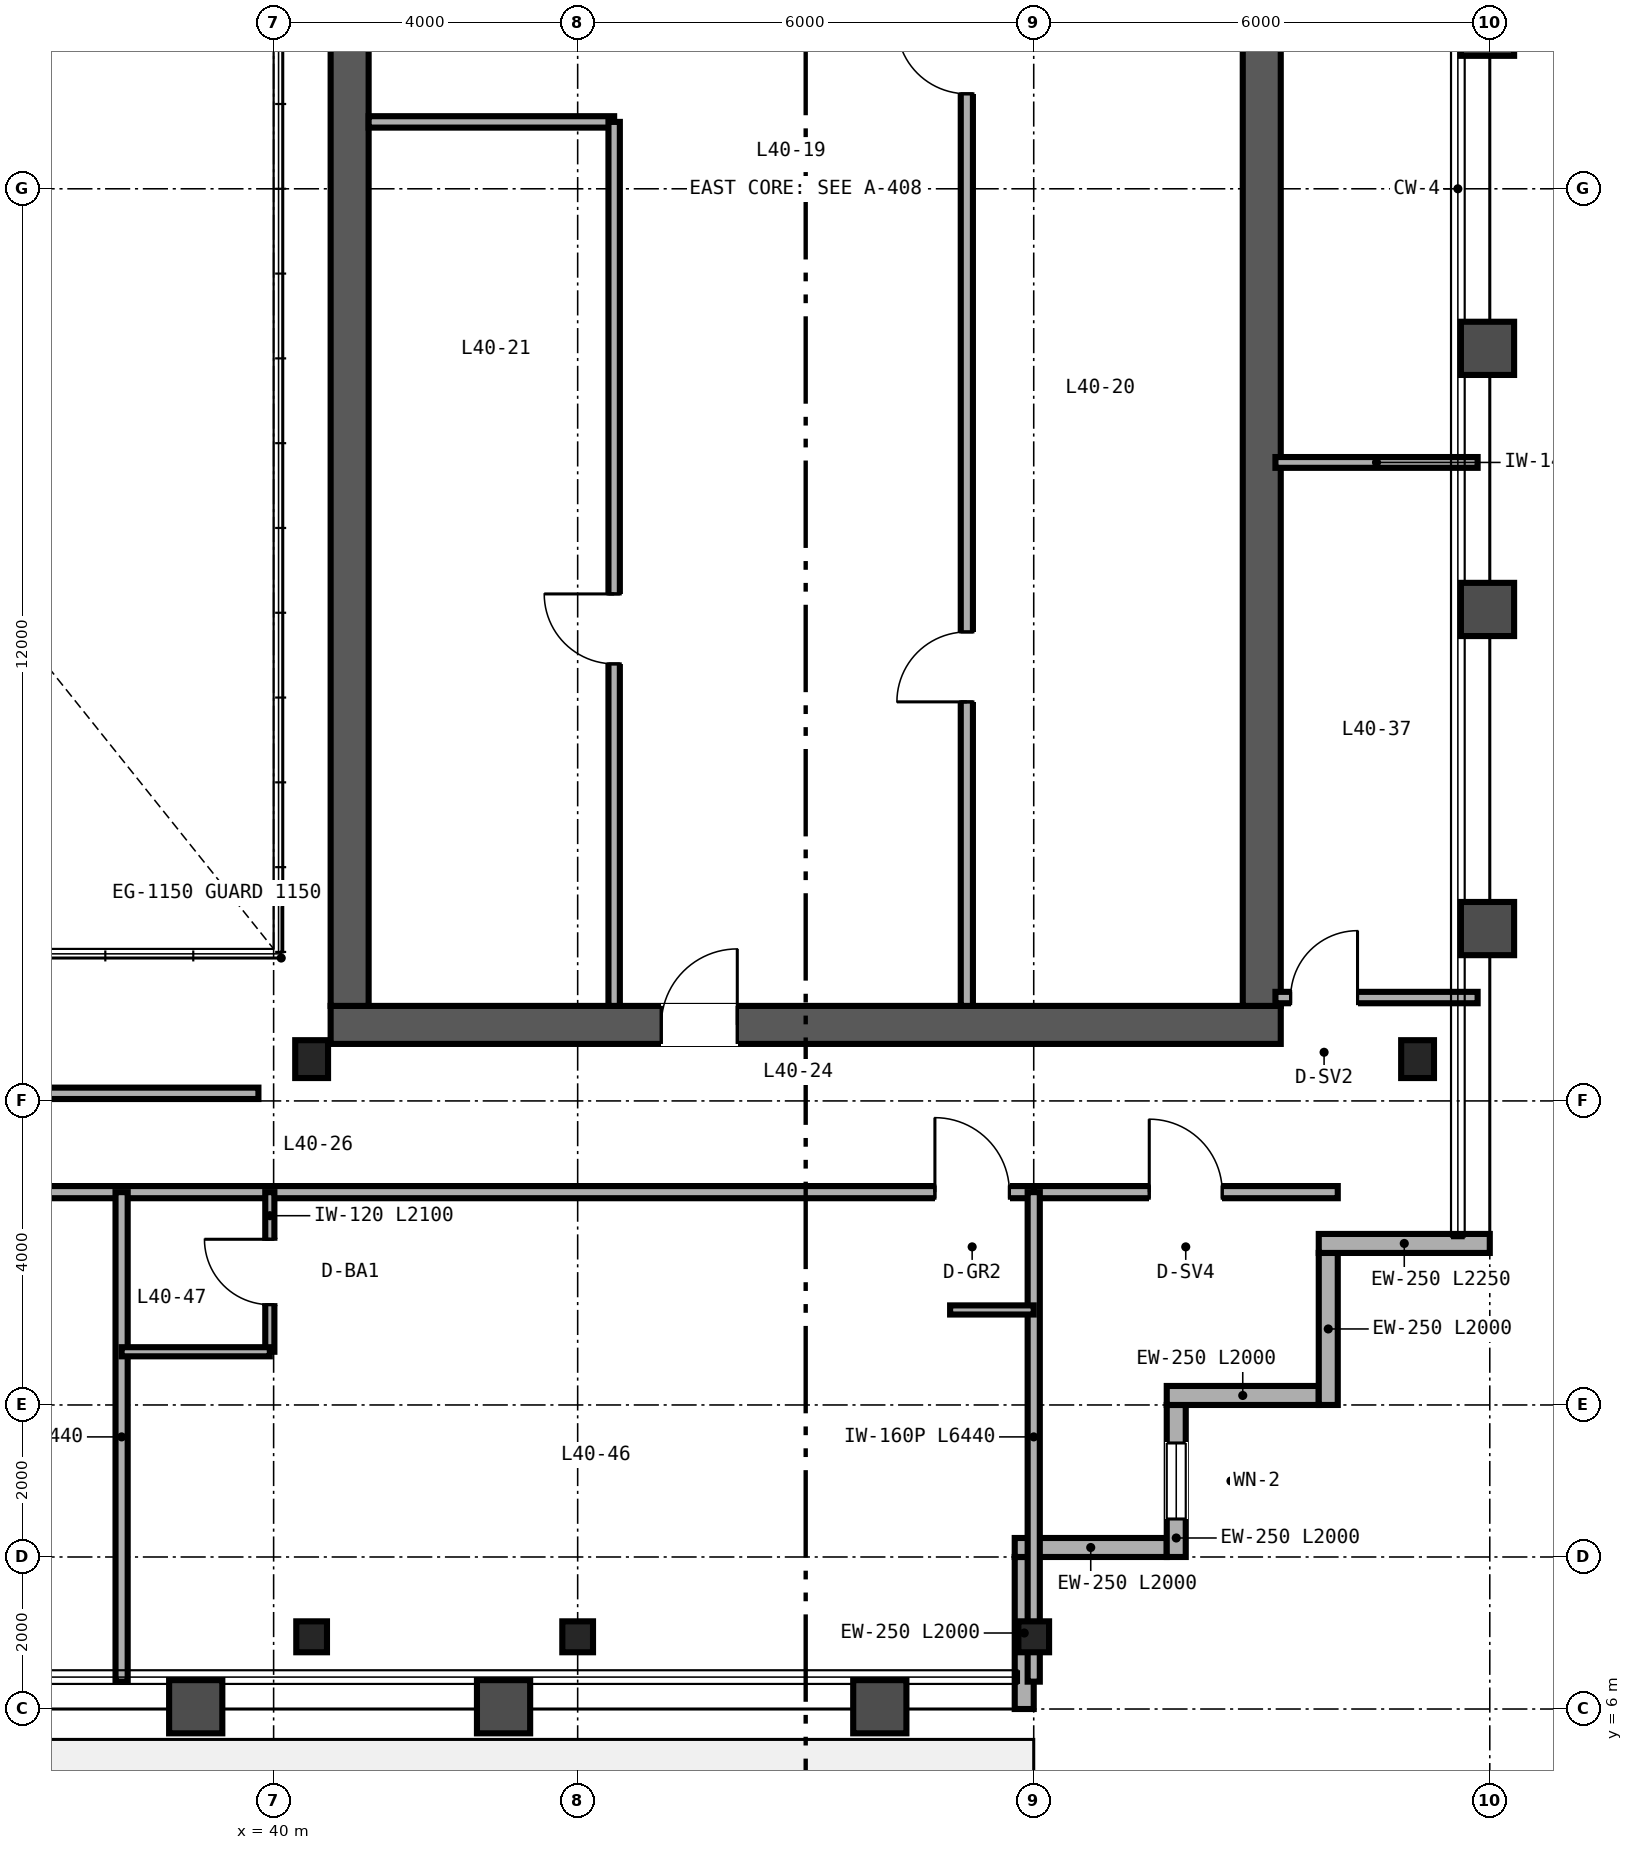
"""IFC4 building model, lengths in metres.
Left out: names, types, materials, properties, quantities, classifications, styles, units other than length and angle.
Written with IfcOpenShell. Run it as: python <this file> out.ifc"""

import sys

from ifc_helpers import new_model, si_unit, direction, frame, frame_2d, origin, origin_2d, place, context, subcontext, project, spatial, rectangle, i_section, extrude, source, transform, mapped, element, fill, save


model = new_model("IFC4")
c1 = context("Model", 3, precision=1e-05, world=origin(), true_north=direction((0.0, 1.0)))
c2 = subcontext(c1, "Body", "Model", "MODEL_VIEW")
j1 = project(units=[si_unit("LENGTHUNIT", "METRE"), si_unit("PLANEANGLEUNIT", "RADIAN")], contexts=[c1])
p1 = place(None, origin())
s1 = spatial("IfcSite", under=j1, at=p1, CompositionType="ELEMENT")
p2 = place(p1, origin())
s2 = spatial("IfcBuilding", under=s1, at=p2, CompositionType="ELEMENT")
p3 = place(p2, frame((0.0, 0.0, 163.2)))
s3 = spatial("IfcBuildingStorey", under=s2, at=p3, CompositionType="ELEMENT", Elevation=163.2)
p4 = place(p3, frame((40.75, 15.0, 0.0), z_axis=(0.0, 0.0, 1.0), x_axis=(1.0, 0.0, 0.0)))
e1 = element("IfcWall", 1, at=p4, inside=s3, PredefinedType="SHEAR", context=c2, shape_type="SweptSolid", body=[
    extrude(rectangle(XDim=12.5, YDim=0.5, at=frame_2d((6.25, 0.0))), origin(), (0.0, 0.0, 1.0), 3.37),
])
p5 = place(p4, frame((4.35, 0.0, 0.0)))
e2 = element("IfcOpeningElement", 2, at=p5, cuts=e1, PredefinedType="OPENING", context=c2, shape_type="SweptSolid", body=[
    extrude(rectangle(XDim=1.0, YDim=2.15, at=frame_2d((0.5, 1.075))), frame((0.0, 0.26, 0.0), z_axis=(0.0, -1.0, 0.0), x_axis=(1.0, 0.0, 0.0)), (0.0, 0.0, 1.0), 0.52),
])
for number, where, z_axis, x_axis in (
    (3, (41.0, 15.25, 0.0), (0.0, 0.0, 1.0), (0.0, 1.0, 0.0)),
    (4, (53.0, 15.25, 0.0), (0.0, 0.0, 1.0), (0.0, 1.0, 0.0)),
):
    element("IfcWall", number, at=place(p3, frame(where, z_axis=z_axis, x_axis=x_axis)), inside=s3, PredefinedType="SHEAR", context=c2, shape_type="SweptSolid", body=[
        extrude(rectangle(XDim=21.5, YDim=0.5, at=frame_2d((10.75, 0.0))), origin(), (0.0, 0.0, 1.0), 3.37),
    ])
m1 = source(origin(), c2, "Body", "SweptSolid", [
    extrude(i_section(OverallWidth=0.432, OverallDepth=0.498, WebThickness=0.056, FlangeThickness=0.089, FilletRadius=0.025, at=origin_2d()), origin(), (0.0, 0.0, 1.0), 3.37),
])
for number, where, z_axis, x_axis in (
    (5, (40.5, 14.55, 0.0), (0.0, 0.0, 1.0), (1.0, 0.0, 0.0)),
    (6, (55.05, 14.55, 0.0), (0.0, 0.0, 1.0), (1.0, 0.0, 0.0)),
):
    element("IfcColumn", number, at=place(p3, frame(where, z_axis=z_axis, x_axis=x_axis)), inside=s3, PredefinedType="COLUMN", context=c2, shape_type="MappedRepresentation", body=[
        mapped(m1, transform((0.0, 0.0, 0.0), scale=1.0)),
    ])
m2 = source(origin(), c2, "Body", "SweptSolid", [
    extrude(i_section(OverallWidth=0.404, OverallDepth=0.407, WebThickness=0.027, FlangeThickness=0.044, FilletRadius=0.025, at=origin_2d()), origin(), (0.0, 0.0, 1.0), 3.37),
])
for number, where, z_axis, x_axis in (
    (7, (40.5, 6.95, 0.0), (0.0, 0.0, 1.0), (1.0, 0.0, 0.0)),
    (8, (44.0, 6.95, 0.0), (0.0, 0.0, 1.0), (1.0, 0.0, 0.0)),
    (9, (50.0, 6.95, 0.0), (0.0, 0.0, 1.0), (1.0, 0.0, 0.0)),
):
    element("IfcColumn", number, at=place(p3, frame(where, z_axis=z_axis, x_axis=x_axis)), inside=s3, PredefinedType="COLUMN", context=c2, shape_type="MappedRepresentation", body=[
        mapped(m2, transform((0.0, 0.0, 0.0), scale=1.0)),
    ])
p6 = place(p3, frame((49.875, 6.0, 0.0), z_axis=(0.0, 0.0, 1.0), x_axis=(0.0, 1.0, 0.0)))
e10 = element("IfcWall", 10, at=p6, inside=s3, PredefinedType="SOLIDWALL", context=c2, shape_type="SweptSolid", body=[
    extrude(rectangle(XDim=2.0, YDim=0.25, at=frame_2d((1.0, 0.0))), origin(), (0.0, 0.0, 1.0), 2.677),
])
p7 = place(p3, frame((49.75, 8.125, 0.0), z_axis=(0.0, 0.0, 1.0), x_axis=(1.0, 0.0, 0.0)))
e11 = element("IfcWall", 11, at=p7, inside=s3, PredefinedType="SOLIDWALL", context=c2, shape_type="SweptSolid", body=[
    extrude(rectangle(XDim=2.0, YDim=0.25, at=frame_2d((1.0, 0.0))), origin(), (0.0, 0.0, 1.0), 3.37),
])
p8 = place(p3, frame((51.875, 8.0, 0.0), z_axis=(0.0, 0.0, 1.0), x_axis=(0.0, 1.0, 0.0)))
e12 = element("IfcWall", 12, at=p8, inside=s3, PredefinedType="SOLIDWALL", context=c2, shape_type="SweptSolid", body=[
    extrude(rectangle(XDim=2.0, YDim=0.25, at=frame_2d((1.0, 0.0))), origin(), (0.0, 0.0, 1.0), 3.37),
])
p9 = place(p8, frame((0.5, 0.0, 0.85)))
e13 = element("IfcOpeningElement", 13, at=p9, cuts=e12, PredefinedType="OPENING", context=c2, shape_type="SweptSolid", body=[
    extrude(rectangle(XDim=1.0, YDim=1.9, at=frame_2d((0.5, 0.95))), frame((0.0, 0.135, 0.0), z_axis=(0.0, -1.0, 0.0), x_axis=(1.0, 0.0, 0.0)), (0.0, 0.0, 1.0), 0.27),
])
for number, where, z_axis, x_axis in (
    (14, (51.75, 10.125, 0.0), (0.0, 0.0, 1.0), (1.0, 0.0, 0.0)),
    (15, (53.875, 10.0, 0.0), (0.0, 0.0, 1.0), (0.0, 1.0, 0.0)),
):
    element("IfcWall", number, at=place(p3, frame(where, z_axis=z_axis, x_axis=x_axis)), inside=s3, PredefinedType="SOLIDWALL", context=c2, shape_type="SweptSolid", body=[
        extrude(rectangle(XDim=2.0, YDim=0.25, at=frame_2d((1.0, 0.0))), origin(), (0.0, 0.0, 1.0), 3.37),
    ])
p10 = place(p3, frame((53.75, 12.125, 0.0), z_axis=(0.0, 0.0, 1.0), x_axis=(1.0, 0.0, 0.0)))
e16 = element("IfcWall", 16, at=p10, inside=s3, PredefinedType="SOLIDWALL", context=c2, shape_type="SweptSolid", body=[
    extrude(rectangle(XDim=2.25, YDim=0.25, at=frame_2d((1.125, 0.0))), origin(), (0.0, 0.0, 1.0), 3.37),
])
p11 = place(p3, frame((49.12, 15.25, 0.0), z_axis=(0.0, 0.0, 1.0), x_axis=(0.0, 1.0, 0.0)))
e17 = element("IfcWall", 17, at=p11, inside=s3, PredefinedType="PARTITIONING", context=c2, shape_type="SweptSolid", body=[
    extrude(rectangle(XDim=16.13, YDim=0.16, at=frame_2d((8.065, 0.0))), origin(), (0.0, 0.0, 1.0), 2.443),
])
p12 = place(p11, frame((4.0, 0.0, 0.0)))
e18 = element("IfcOpeningElement", 18, at=p12, cuts=e17, PredefinedType="OPENING", context=c2, shape_type="SweptSolid", body=[
    extrude(rectangle(XDim=0.92, YDim=2.15, at=frame_2d((0.46, 1.075))), frame((0.0, 0.09, 0.0), z_axis=(0.0, -1.0, 0.0), x_axis=(1.0, 0.0, 0.0)), (0.0, 0.0, 1.0), 0.18),
])
p13 = place(p11, frame((12.0, 0.0, 0.0)))
e19 = element("IfcOpeningElement", 19, at=p13, cuts=e17, PredefinedType="OPENING", context=c2, shape_type="SweptSolid", body=[
    extrude(rectangle(XDim=0.92, YDim=2.15, at=frame_2d((0.46, 1.075))), frame((0.0, 0.09, 0.0), z_axis=(0.0, -1.0, 0.0), x_axis=(1.0, 0.0, 0.0)), (0.0, 0.0, 1.0), 0.18),
])
p14 = place(p3, frame((41.25, 26.88, 0.0), z_axis=(0.0, 0.0, 1.0), x_axis=(1.0, 0.0, 0.0)))
e20 = element("IfcWall", 20, at=p14, inside=s3, PredefinedType="PARTITIONING", context=c2, shape_type="SweptSolid", body=[
    extrude(rectangle(XDim=3.23, YDim=0.15, at=frame_2d((1.615, 0.0))), origin(), (0.0, 0.0, 1.0), 3.37),
])
p15 = place(p3, frame((44.48, 15.25, 0.0), z_axis=(0.0, 0.0, 1.0), x_axis=(0.0, 1.0, 0.0)))
e21 = element("IfcWall", 21, at=p15, inside=s3, PredefinedType="PARTITIONING", context=c2, shape_type="SweptSolid", body=[
    extrude(rectangle(XDim=11.63, YDim=0.15, at=frame_2d((5.815, 0.0))), origin(), (0.0, 0.0, 1.0), 3.37),
])
p16 = place(p15, frame((4.5, 0.0, 0.0)))
e22 = element("IfcOpeningElement", 22, at=p16, cuts=e21, PredefinedType="OPENING", context=c2, shape_type="SweptSolid", body=[
    extrude(rectangle(XDim=0.92, YDim=2.15, at=frame_2d((0.46, 1.075))), frame((0.0, 0.085, 0.0), z_axis=(0.0, -1.0, 0.0), x_axis=(1.0, 0.0, 0.0)), (0.0, 0.0, 1.0), 0.17),
])
p17 = place(p3, frame((24.2, 14.1, 0.0), z_axis=(0.0, 0.0, 1.0), x_axis=(1.0, 0.0, 0.0)))
e23 = element("IfcWall", 23, at=p17, inside=s3, PredefinedType="PARTITIONING", context=c2, shape_type="SweptSolid", body=[
    extrude(rectangle(XDim=15.6, YDim=0.15, at=frame_2d((7.8, 0.0))), origin(), (0.0, 0.0, 1.0), 3.37),
])
p18 = place(p17, frame((7.0, 0.0, 0.0)))
e24 = element("IfcOpeningElement", 24, at=p18, cuts=e23, PredefinedType="OPENING", context=c2, shape_type="SweptSolid", body=[
    extrude(rectangle(XDim=0.96, YDim=2.15, at=frame_2d((0.48, 1.075))), frame((0.0, 0.085, 0.0), z_axis=(0.0, -1.0, 0.0), x_axis=(1.0, 0.0, 0.0)), (0.0, 0.0, 1.0), 0.17),
])
p19 = place(p3, frame((53.18, 15.36, 0.0), z_axis=(0.0, 0.0, 1.0), x_axis=(1.0, 0.0, 0.0)))
e25 = element("IfcWall", 25, at=p19, inside=s3, PredefinedType="PARTITIONING", context=c2, shape_type="SweptSolid", body=[
    extrude(rectangle(XDim=2.66, YDim=0.15, at=frame_2d((1.33, 0.0))), origin(), (0.0, 0.0, 1.0), 2.591),
])
p20 = place(p19, frame((0.2, 0.0, 0.0)))
e26 = element("IfcOpeningElement", 26, at=p20, cuts=e25, PredefinedType="OPENING", context=c2, shape_type="SweptSolid", body=[
    extrude(rectangle(XDim=0.88, YDim=2.15, at=frame_2d((0.44, 1.075))), frame((0.0, 0.085, 0.0), z_axis=(0.0, -1.0, 0.0), x_axis=(1.0, 0.0, 0.0)), (0.0, 0.0, 1.0), 0.17),
])
p21 = place(p3, frame((53.18, 22.4, 0.0), z_axis=(0.0, 0.0, 1.0), x_axis=(1.0, 0.0, 0.0)))
e27 = element("IfcWall", 27, at=p21, inside=s3, PredefinedType="PARTITIONING", context=c2, shape_type="SweptSolid", body=[
    extrude(rectangle(XDim=2.66, YDim=0.142, at=frame_2d((1.33, 0.0))), origin(), (0.0, 0.0, 1.0), 2.591),
])
p22 = place(p3, frame((50.0, 12.8, 0.0), z_axis=(0.0, 0.0, 1.0), x_axis=(1.0, 0.0, 0.0)))
e28 = element("IfcWall", 28, at=p22, inside=s3, PredefinedType="PARTITIONING", context=c2, shape_type="SweptSolid", body=[
    extrude(rectangle(XDim=4.0, YDim=0.16, at=frame_2d((2.0, 0.0))), origin(), (0.0, 0.0, 1.0), 3.37),
])
p23 = place(p22, frame((1.52, 0.0, 0.0)))
e29 = element("IfcOpeningElement", 29, at=p23, cuts=e28, PredefinedType="OPENING", context=c2, shape_type="SweptSolid", body=[
    extrude(rectangle(XDim=0.96, YDim=2.15, at=frame_2d((0.48, 1.075))), frame((0.0, 0.09, 0.0), z_axis=(0.0, -1.0, 0.0), x_axis=(1.0, 0.0, 0.0)), (0.0, 0.0, 1.0), 0.18),
])
p24 = place(p3, frame((14.0, 12.8, 0.0), z_axis=(0.0, 0.0, 1.0), x_axis=(1.0, 0.0, 0.0)))
e30 = element("IfcWall", 30, at=p24, inside=s3, PredefinedType="PARTITIONING", context=c2, shape_type="SweptSolid", body=[
    extrude(rectangle(XDim=36.0, YDim=0.16, at=frame_2d((18.0, 0.0))), origin(), (0.0, 0.0, 1.0), 2.913),
])
p25 = place(p24, frame((10.7, 0.0, 0.0)))
e31 = element("IfcOpeningElement", 31, at=p25, cuts=e30, PredefinedType="OPENING", context=c2, shape_type="SweptSolid", body=[
    extrude(rectangle(XDim=0.98, YDim=2.2, at=frame_2d((0.49, 1.1))), frame((0.0, 0.09, 0.0), z_axis=(0.0, -1.0, 0.0), x_axis=(1.0, 0.0, 0.0)), (0.0, 0.0, 1.0), 0.18),
])
p26 = place(p24, frame((17.52, 0.0, 0.0)))
e32 = element("IfcOpeningElement", 32, at=p26, cuts=e30, PredefinedType="OPENING", context=c2, shape_type="SweptSolid", body=[
    extrude(rectangle(XDim=0.96, YDim=2.15, at=frame_2d((0.48, 1.075))), frame((0.0, 0.09, 0.0), z_axis=(0.0, -1.0, 0.0), x_axis=(1.0, 0.0, 0.0)), (0.0, 0.0, 1.0), 0.18),
])
p27 = place(p24, frame((34.7, 0.0, 0.0)))
e33 = element("IfcOpeningElement", 33, at=p27, cuts=e30, PredefinedType="OPENING", context=c2, shape_type="SweptSolid", body=[
    extrude(rectangle(XDim=0.98, YDim=2.2, at=frame_2d((0.49, 1.1))), frame((0.0, 0.09, 0.0), z_axis=(0.0, -1.0, 0.0), x_axis=(1.0, 0.0, 0.0)), (0.0, 0.0, 1.0), 0.18),
])
p28 = place(p3, frame((50.0, 6.36, 0.0), z_axis=(0.0, 0.0, 1.0), x_axis=(0.0, 1.0, 0.0)))
e34 = element("IfcWall", 34, at=p28, inside=s3, PredefinedType="PARTITIONING", context=c2, shape_type="SweptSolid", body=[
    extrude(rectangle(XDim=6.44, YDim=0.16, at=frame_2d((3.22, 0.0))), origin(), (0.0, 0.0, 1.0), 2.677),
])
p29 = place(p3, frame((38.0, 6.36, 0.0), z_axis=(0.0, 0.0, 1.0), x_axis=(0.0, 1.0, 0.0)))
e35 = element("IfcWall", 35, at=p29, inside=s3, PredefinedType="PARTITIONING", context=c2, shape_type="SweptSolid", body=[
    extrude(rectangle(XDim=6.44, YDim=0.16, at=frame_2d((3.22, 0.0))), origin(), (0.0, 0.0, 1.0), 2.443),
])
p30 = place(p3, frame((39.95, 10.7, 0.0), z_axis=(0.0, 0.0, 1.0), x_axis=(0.0, 1.0, 0.0)))
e36 = element("IfcWall", 36, at=p30, inside=s3, PredefinedType="PARTITIONING", context=c2, shape_type="SweptSolid", body=[
    extrude(rectangle(XDim=2.1, YDim=0.12, at=frame_2d((1.05, 0.0))), origin(), (0.0, 0.0, 1.0), 3.37),
])
p31 = place(p30, frame((0.62, 0.0, 0.0)))
e37 = element("IfcOpeningElement", 37, at=p31, cuts=e36, PredefinedType="OPENING", context=c2, shape_type="SweptSolid", body=[
    extrude(rectangle(XDim=0.86, YDim=2.1, at=frame_2d((0.43, 1.05))), frame((0.0, 0.07, 0.0), z_axis=(0.0, -1.0, 0.0), x_axis=(1.0, 0.0, 0.0)), (0.0, 0.0, 1.0), 0.14),
])
p32 = place(p3, frame((38.0, 10.7, 0.0), z_axis=(0.0, 0.0, 1.0), x_axis=(1.0, 0.0, 0.0)))
e38 = element("IfcWall", 38, at=p32, inside=s3, PredefinedType="PARTITIONING", context=c2, shape_type="SweptSolid", body=[
    extrude(rectangle(XDim=1.95, YDim=0.12, at=frame_2d((0.975, 0.0))), origin(), (0.0, 0.0, 1.0), 3.37),
])
p33 = place(p3, frame((48.9, 11.25, 0.0), z_axis=(0.0, 0.0, 1.0), x_axis=(1.0, 0.0, 0.0)))
e39 = element("IfcWall", 39, at=p33, inside=s3, PredefinedType="PARTITIONING", context=c2, shape_type="SweptSolid", body=[
    extrude(rectangle(XDim=1.1, YDim=0.12, at=frame_2d((0.55, 0.0))), origin(), (0.0, 0.0, 1.0), 3.37),
])
m3 = source(origin(), c2, "Body", "SweptSolid", [
    extrude(rectangle(XDim=1.0, YDim=1.9, at=frame_2d((0.5, 0.95))), frame((0.0, 0.03, 0.0), z_axis=(0.0, -1.0, 0.0), x_axis=(1.0, 0.0, 0.0)), (0.0, 0.0, 1.0), 0.06),
])
p34 = place(p9, origin())
e40 = element("IfcWindow", 40, at=p34, inside=s3, PartitioningType="SINGLE_PANEL", PredefinedType="WINDOW", context=c2, shape_type="MappedRepresentation", body=[
    mapped(m3, transform((0.0, 0.0, 0.0), scale=1.0)),
])
fill(e13, e40)
m4 = source(origin(), c2, "Body", "SweptSolid", [
    extrude(rectangle(XDim=1.0, YDim=2.15, at=frame_2d((0.5, 1.075))), frame((0.0, 0.025, 0.0), z_axis=(0.0, -1.0, 0.0), x_axis=(1.0, 0.0, 0.0)), (0.0, 0.0, 1.0), 0.05),
])
p35 = place(p5, origin())
e41 = element("IfcDoor", 41, at=p35, inside=s3, OperationType="SINGLE_SWING_RIGHT", PredefinedType="DOOR", context=c2, shape_type="MappedRepresentation", body=[
    mapped(m4, transform((0.0, 0.0, 0.0), scale=1.0)),
])
fill(e2, e41)
m5 = source(origin(), c2, "Body", "SweptSolid", [
    extrude(rectangle(XDim=0.92, YDim=2.15, at=frame_2d((0.46, 1.075))), frame((0.0, 0.025, 0.0), z_axis=(0.0, -1.0, 0.0), x_axis=(1.0, 0.0, 0.0)), (0.0, 0.0, 1.0), 0.05),
])
p36 = place(p12, origin())
e42 = element("IfcDoor", 42, at=p36, inside=s3, OperationType="SINGLE_SWING_LEFT", PredefinedType="DOOR", context=c2, shape_type="MappedRepresentation", body=[
    mapped(m5, transform((0.0, 0.0, 0.0), scale=1.0)),
])
fill(e18, e42)
p37 = place(p13, origin())
e43 = element("IfcDoor", 43, at=p37, inside=s3, OperationType="SINGLE_SWING_RIGHT", PredefinedType="DOOR", context=c2, shape_type="MappedRepresentation", body=[
    mapped(m5, transform((0.0, 0.0, 0.0), scale=1.0)),
])
fill(e19, e43)
p38 = place(p16, origin())
e44 = element("IfcDoor", 44, at=p38, inside=s3, OperationType="SINGLE_SWING_RIGHT", PredefinedType="DOOR", context=c2, shape_type="MappedRepresentation", body=[
    mapped(m5, transform((0.0, 0.0, 0.0), scale=1.0)),
])
fill(e22, e44)
m6 = source(origin(), c2, "Body", "SweptSolid", [
    extrude(rectangle(XDim=0.88, YDim=2.15, at=frame_2d((0.44, 1.075))), frame((0.0, 0.025, 0.0), z_axis=(0.0, -1.0, 0.0), x_axis=(1.0, 0.0, 0.0)), (0.0, 0.0, 1.0), 0.05),
])
p39 = place(p20, origin())
e45 = element("IfcDoor", 45, at=p39, inside=s3, OperationType="SINGLE_SWING_RIGHT", PredefinedType="DOOR", context=c2, shape_type="MappedRepresentation", body=[
    mapped(m6, transform((0.0, 0.0, 0.0), scale=1.0)),
])
fill(e26, e45)
m7 = source(origin(), c2, "Body", "SweptSolid", [
    extrude(rectangle(XDim=0.96, YDim=2.15, at=frame_2d((0.48, 1.075))), frame((0.0, 0.025, 0.0), z_axis=(0.0, -1.0, 0.0), x_axis=(1.0, 0.0, 0.0)), (0.0, 0.0, 1.0), 0.05),
])
p40 = place(p23, origin())
e46 = element("IfcDoor", 46, at=p40, inside=s3, OperationType="SINGLE_SWING_LEFT", PredefinedType="DOOR", context=c2, shape_type="MappedRepresentation", body=[
    mapped(m7, transform((0.0, 0.0, 0.0), scale=1.0)),
])
fill(e29, e46)
m8 = source(origin(), c2, "Body", "SweptSolid", [
    extrude(rectangle(XDim=0.86, YDim=2.1, at=frame_2d((0.43, 1.05))), frame((0.0, 0.025, 0.0), z_axis=(0.0, -1.0, 0.0), x_axis=(1.0, 0.0, 0.0)), (0.0, 0.0, 1.0), 0.05),
])
p41 = place(p31, origin())
e47 = element("IfcDoor", 47, at=p41, inside=s3, OperationType="SINGLE_SWING_RIGHT", PredefinedType="DOOR", context=c2, shape_type="MappedRepresentation", body=[
    mapped(m8, transform((0.0, 0.0, 0.0), scale=1.0)),
])
fill(e37, e47)
m9 = source(origin(), c2, "Body", "SweptSolid", [
    extrude(rectangle(XDim=0.98, YDim=2.2, at=frame_2d((0.49, 1.1))), frame((0.0, 0.025, 0.0), z_axis=(0.0, -1.0, 0.0), x_axis=(1.0, 0.0, 0.0)), (0.0, 0.0, 1.0), 0.05),
])
p42 = place(p27, origin())
e48 = element("IfcDoor", 48, at=p42, inside=s3, OperationType="SINGLE_SWING_LEFT", PredefinedType="DOOR", context=c2, shape_type="MappedRepresentation", body=[
    mapped(m9, transform((0.0, 0.0, 0.0), scale=1.0)),
])
fill(e33, e48)
save(model, sys.argv[1])
